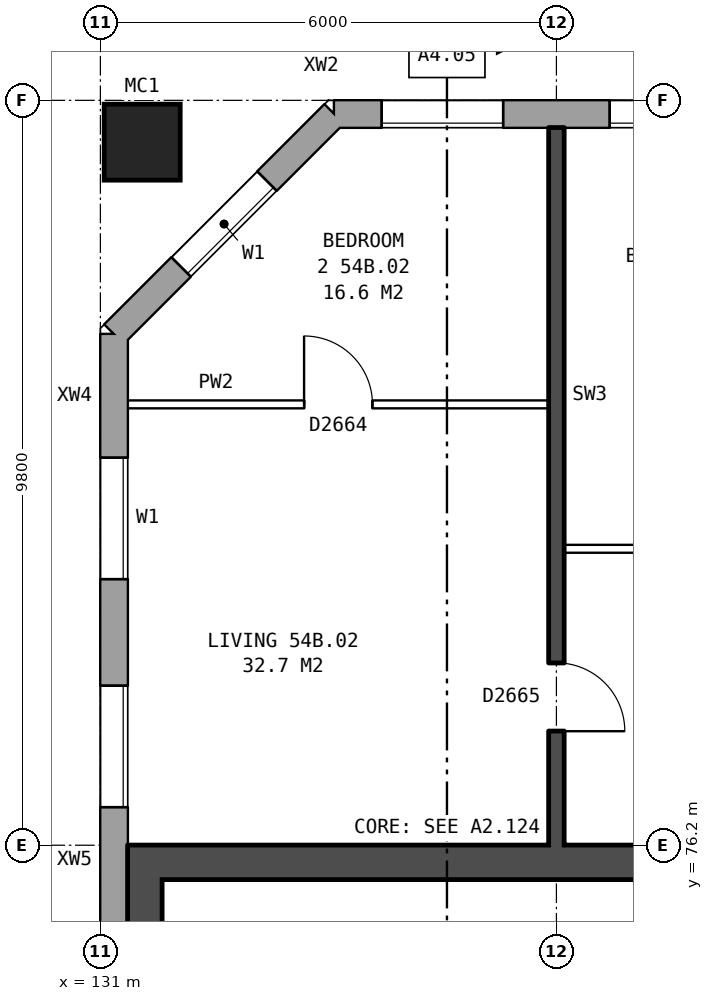
"""IFC4 building model, lengths in metres.
Left out: names, types, materials, properties, quantities, classifications, styles, units other than length and angle.
Written with IfcOpenShell. Run it as: python <this file> out.ifc"""

import sys

from ifc_helpers import new_model, si_unit, direction, frame, frame_2d, origin, origin_2d, place, context, subcontext, project, spatial, rectangle, hollow_rectangle, extrude, element, fill, save


model = new_model("IFC4")
c1 = context("Model", 3, precision=1e-05, world=origin(), true_north=direction((0.0, 1.0)))
c2 = subcontext(c1, "Body", "Model", "MODEL_VIEW")
j1 = project(units=[si_unit("LENGTHUNIT", "METRE"), si_unit("PLANEANGLEUNIT", "RADIAN")], contexts=[c1])
p1 = place(None, origin())
s1 = spatial("IfcSite", under=j1, at=p1, CompositionType="ELEMENT")
p2 = place(p1, origin())
s2 = spatial("IfcBuilding", under=s1, at=p2, CompositionType="ELEMENT")
p3 = place(p2, frame((0.0, 0.0, 191.3)))
s3 = spatial("IfcBuildingStorey", under=s2, at=p3, CompositionType="ELEMENT", Elevation=191.3)
p4 = place(p3, frame((131.55, 85.45, 0.0), z_axis=(0.0, 0.0, 1.0), x_axis=(1.0, 0.0, 0.0)))
e1 = element("IfcColumn", 1, at=p4, inside=s3, PredefinedType="COLUMN", context=c2, shape_type="SweptSolid", body=[
    extrude(hollow_rectangle(XDim=1.0, YDim=1.0, WallThickness=0.055, at=origin_2d()), origin(), (0.0, 0.0, 1.0), 3.1),
])
p5 = place(p3, frame((167.175, 85.82, 0.0), z_axis=(0.0, 0.0, 1.0), x_axis=(-1.0, 0.0, 0.0)))
e2 = element("IfcWall", 2, at=p5, inside=s3, PredefinedType="STANDARD", context=c2, shape_type="SweptSolid", body=[
    extrude(rectangle(XDim=33.101, YDim=0.36, at=frame_2d((16.55, 0.0))), origin(), (0.0, 0.0, 1.0), 2.85),
])
p6 = place(p5, frame((0.875, 0.0, 0.8)))
e3 = element("IfcOpeningElement", 3, at=p6, cuts=e2, PredefinedType="OPENING", context=c2, shape_type="SweptSolid", body=[
    extrude(rectangle(XDim=1.6, YDim=1.8, at=frame_2d((0.8, 0.9))), frame((0.0, 0.19, 0.0), z_axis=(0.0, -1.0, 0.0), x_axis=(1.0, 0.0, 0.0)), (0.0, 0.0, 1.0), 0.38),
])
p7 = place(p5, frame((3.875, 0.0, 0.8)))
e4 = element("IfcOpeningElement", 4, at=p7, cuts=e2, PredefinedType="OPENING", context=c2, shape_type="SweptSolid", body=[
    extrude(rectangle(XDim=1.6, YDim=1.8, at=frame_2d((0.8, 0.9))), frame((0.0, 0.19, 0.0), z_axis=(0.0, -1.0, 0.0), x_axis=(1.0, 0.0, 0.0)), (0.0, 0.0, 1.0), 0.38),
])
p8 = place(p5, frame((6.875, 0.0, 0.8)))
e5 = element("IfcOpeningElement", 5, at=p8, cuts=e2, PredefinedType="OPENING", context=c2, shape_type="SweptSolid", body=[
    extrude(rectangle(XDim=1.6, YDim=1.8, at=frame_2d((0.8, 0.9))), frame((0.0, 0.19, 0.0), z_axis=(0.0, -1.0, 0.0), x_axis=(1.0, 0.0, 0.0)), (0.0, 0.0, 1.0), 0.38),
])
p9 = place(p5, frame((9.875, 0.0, 0.8)))
e6 = element("IfcOpeningElement", 6, at=p9, cuts=e2, PredefinedType="OPENING", context=c2, shape_type="SweptSolid", body=[
    extrude(rectangle(XDim=1.6, YDim=1.8, at=frame_2d((0.8, 0.9))), frame((0.0, 0.19, 0.0), z_axis=(0.0, -1.0, 0.0), x_axis=(1.0, 0.0, 0.0)), (0.0, 0.0, 1.0), 0.38),
])
p10 = place(p5, frame((12.875, 0.0, 0.8)))
e7 = element("IfcOpeningElement", 7, at=p10, cuts=e2, PredefinedType="OPENING", context=c2, shape_type="SweptSolid", body=[
    extrude(rectangle(XDim=1.6, YDim=1.8, at=frame_2d((0.8, 0.9))), frame((0.0, 0.19, 0.0), z_axis=(0.0, -1.0, 0.0), x_axis=(1.0, 0.0, 0.0)), (0.0, 0.0, 1.0), 0.38),
])
p11 = place(p5, frame((15.925, 0.0, 0.15)))
e8 = element("IfcOpeningElement", 8, at=p11, cuts=e2, PredefinedType="OPENING", context=c2, shape_type="SweptSolid", body=[
    extrude(rectangle(XDim=1.2, YDim=1.2, at=frame_2d((0.6, 0.6))), frame((0.0, 0.19, 0.0), z_axis=(0.0, -1.0, 0.0), x_axis=(1.0, 0.0, 0.0)), (0.0, 0.0, 1.0), 0.38),
])
p12 = place(p5, frame((18.875, 0.0, 0.8)))
e9 = element("IfcOpeningElement", 9, at=p12, cuts=e2, PredefinedType="OPENING", context=c2, shape_type="SweptSolid", body=[
    extrude(rectangle(XDim=1.6, YDim=1.8, at=frame_2d((0.8, 0.9))), frame((0.0, 0.19, 0.0), z_axis=(0.0, -1.0, 0.0), x_axis=(1.0, 0.0, 0.0)), (0.0, 0.0, 1.0), 0.38),
])
p13 = place(p5, frame((21.875, 0.0, 0.8)))
e10 = element("IfcOpeningElement", 10, at=p13, cuts=e2, PredefinedType="OPENING", context=c2, shape_type="SweptSolid", body=[
    extrude(rectangle(XDim=1.6, YDim=1.8, at=frame_2d((0.8, 0.9))), frame((0.0, 0.19, 0.0), z_axis=(0.0, -1.0, 0.0), x_axis=(1.0, 0.0, 0.0)), (0.0, 0.0, 1.0), 0.38),
])
p14 = place(p5, frame((24.875, 0.0, 0.8)))
e11 = element("IfcOpeningElement", 11, at=p14, cuts=e2, PredefinedType="OPENING", context=c2, shape_type="SweptSolid", body=[
    extrude(rectangle(XDim=1.6, YDim=1.8, at=frame_2d((0.8, 0.9))), frame((0.0, 0.19, 0.0), z_axis=(0.0, -1.0, 0.0), x_axis=(1.0, 0.0, 0.0)), (0.0, 0.0, 1.0), 0.38),
])
p15 = place(p5, frame((27.875, 0.0, 0.8)))
e12 = element("IfcOpeningElement", 12, at=p15, cuts=e2, PredefinedType="OPENING", context=c2, shape_type="SweptSolid", body=[
    extrude(rectangle(XDim=1.6, YDim=1.8, at=frame_2d((0.8, 0.9))), frame((0.0, 0.19, 0.0), z_axis=(0.0, -1.0, 0.0), x_axis=(1.0, 0.0, 0.0)), (0.0, 0.0, 1.0), 0.38),
])
p16 = place(p5, frame((30.875, 0.0, 0.8)))
e13 = element("IfcOpeningElement", 13, at=p16, cuts=e2, PredefinedType="OPENING", context=c2, shape_type="SweptSolid", body=[
    extrude(rectangle(XDim=1.6, YDim=1.8, at=frame_2d((0.8, 0.9))), frame((0.0, 0.19, 0.0), z_axis=(0.0, -1.0, 0.0), x_axis=(1.0, 0.0, 0.0)), (0.0, 0.0, 1.0), 0.38),
])
p17 = place(p3, frame((134.075, 85.82, 0.0), z_axis=(0.0, 0.0, 1.0), x_axis=(-0.707106781187, -0.707106781187, 0.0)))
e14 = element("IfcWall", 14, at=p17, inside=s3, PredefinedType="STANDARD", context=c2, shape_type="SweptSolid", body=[
    extrude(rectangle(XDim=4.094, YDim=0.36, at=frame_2d((2.047, 0.0))), origin(), (0.0, 0.0, 1.0), 2.85),
])
p18 = place(p17, frame((1.247, 0.0, 0.8)))
e15 = element("IfcOpeningElement", 15, at=p18, cuts=e14, PredefinedType="OPENING", context=c2, shape_type="SweptSolid", body=[
    extrude(rectangle(XDim=1.6, YDim=1.8, at=frame_2d((0.8, 0.9))), frame((0.0, 0.19, 0.0), z_axis=(0.0, -1.0, 0.0), x_axis=(1.0, 0.0, 0.0)), (0.0, 0.0, 1.0), 0.38),
])
p19 = place(p3, frame((131.18, 82.925, 0.0), z_axis=(0.0, 0.0, 1.0), x_axis=(0.0, -1.0, 0.0)))
e16 = element("IfcWall", 16, at=p19, inside=s3, PredefinedType="STANDARD", context=c2, shape_type="SweptSolid", body=[
    extrude(rectangle(XDim=6.522, YDim=0.36, at=frame_2d((3.261, 0.0))), origin(), (0.0, 0.0, 1.0), 2.85),
])
p20 = place(p19, frame((1.625, 0.0, 0.8)))
e17 = element("IfcOpeningElement", 17, at=p20, cuts=e16, PredefinedType="OPENING", context=c2, shape_type="SweptSolid", body=[
    extrude(rectangle(XDim=1.6, YDim=1.8, at=frame_2d((0.8, 0.9))), frame((0.0, 0.19, 0.0), z_axis=(0.0, -1.0, 0.0), x_axis=(1.0, 0.0, 0.0)), (0.0, 0.0, 1.0), 0.38),
])
p21 = place(p19, frame((4.625, 0.0, 0.8)))
e18 = element("IfcOpeningElement", 18, at=p21, cuts=e16, PredefinedType="OPENING", context=c2, shape_type="SweptSolid", body=[
    extrude(rectangle(XDim=1.6, YDim=1.8, at=frame_2d((0.8, 0.9))), frame((0.0, 0.19, 0.0), z_axis=(0.0, -1.0, 0.0), x_axis=(1.0, 0.0, 0.0)), (0.0, 0.0, 1.0), 0.38),
])
p22 = place(p3, frame((131.18, 76.403, 0.0), z_axis=(0.0, 0.0, 1.0), x_axis=(0.0, -1.0, 0.0)))
e19 = element("IfcWall", 19, at=p22, inside=s3, PredefinedType="STANDARD", context=c2, shape_type="SweptSolid", body=[
    extrude(rectangle(XDim=0.806, YDim=0.36, at=frame_2d((0.403, 0.0))), origin(), (0.0, 0.0, 1.0), 1.947),
])
p23 = place(p3, frame((131.18, 75.597, 0.0), z_axis=(0.0, 0.0, 1.0), x_axis=(0.0, -1.0, 0.0)))
e20 = element("IfcWall", 20, at=p23, inside=s3, PredefinedType="STANDARD", context=c2, shape_type="SweptSolid", body=[
    extrude(rectangle(XDim=11.194, YDim=0.36, at=frame_2d((5.597, 0.0))), origin(), (0.0, 0.0, 1.0), 2.85),
])
p24 = place(p3, frame((131.585, 63.8, 0.0), z_axis=(0.0, 0.0, 1.0), x_axis=(0.0, 1.0, 0.0)))
e21 = element("IfcWall", 21, at=p24, inside=s3, PredefinedType="SHEAR", context=c2, shape_type="SweptSolid", body=[
    extrude(rectangle(XDim=12.4, YDim=0.45, at=frame_2d((6.2, 0.0))), origin(), (0.0, 0.0, 1.0), 2.85),
])
p25 = place(p3, frame((139.31, 75.975, 0.0), z_axis=(0.0, 0.0, 1.0), x_axis=(-1.0, 0.0, 0.0)))
e22 = element("IfcWall", 22, at=p25, inside=s3, PredefinedType="SHEAR", context=c2, shape_type="SweptSolid", body=[
    extrude(rectangle(XDim=7.5, YDim=0.45, at=frame_2d((3.75, 0.0))), origin(), (0.0, 0.0, 1.0), 2.85),
])
p26 = place(p3, frame((137.1, 80.1, 0.0), z_axis=(0.0, 0.0, 1.0), x_axis=(1.0, 0.0, 0.0)))
e23 = element("IfcWall", 23, at=p26, inside=s3, PredefinedType="PARTITIONING", context=c2, shape_type="SweptSolid", body=[
    extrude(rectangle(XDim=5.8, YDim=0.1, at=frame_2d((2.9, 0.0))), origin(), (0.0, 0.0, 1.0), 2.85),
])
p27 = place(p26, frame((1.3, 0.0, 0.0)))
e24 = element("IfcOpeningElement", 24, at=p27, cuts=e23, PredefinedType="OPENING", context=c2, shape_type="SweptSolid", body=[
    extrude(rectangle(XDim=0.9, YDim=2.1, at=frame_2d((0.45, 1.05))), frame((0.0, 0.06, 0.0), z_axis=(0.0, -1.0, 0.0), x_axis=(1.0, 0.0, 0.0)), (0.0, 0.0, 1.0), 0.12),
])
p28 = place(p26, frame((4.2, 0.0, 0.0)))
e25 = element("IfcOpeningElement", 25, at=p28, cuts=e23, PredefinedType="OPENING", context=c2, shape_type="SweptSolid", body=[
    extrude(rectangle(XDim=0.9, YDim=2.1, at=frame_2d((0.45, 1.05))), frame((0.0, 0.06, 0.0), z_axis=(0.0, -1.0, 0.0), x_axis=(1.0, 0.0, 0.0)), (0.0, 0.0, 1.0), 0.12),
])
p29 = place(p3, frame((131.36, 82.0, 0.0), z_axis=(0.0, 0.0, 1.0), x_axis=(1.0, 0.0, 0.0)))
e26 = element("IfcWall", 26, at=p29, inside=s3, PredefinedType="PARTITIONING", context=c2, shape_type="SweptSolid", body=[
    extrude(rectangle(XDim=5.54, YDim=0.1, at=frame_2d((2.77, 0.0))), origin(), (0.0, 0.0, 1.0), 2.85),
])
p30 = place(p29, frame((2.32, 0.0, 0.0)))
e27 = element("IfcOpeningElement", 27, at=p30, cuts=e26, PredefinedType="OPENING", context=c2, shape_type="SweptSolid", body=[
    extrude(rectangle(XDim=0.9, YDim=2.1, at=frame_2d((0.45, 1.05))), frame((0.0, 0.06, 0.0), z_axis=(0.0, -1.0, 0.0), x_axis=(1.0, 0.0, 0.0)), (0.0, 0.0, 1.0), 0.12),
])
p31 = place(p3, frame((137.0, 76.2, 0.0), z_axis=(0.0, 0.0, 1.0), x_axis=(0.0, 1.0, 0.0)))
e28 = element("IfcWall", 28, at=p31, inside=s3, PredefinedType="SOLIDWALL", context=c2, shape_type="SweptSolid", body=[
    extrude(rectangle(XDim=9.44, YDim=0.2, at=frame_2d((4.72, 0.0))), origin(), (0.0, 0.0, 1.0), 2.85),
])
p32 = place(p31, frame((1.5, 0.0, 0.0)))
e29 = element("IfcOpeningElement", 29, at=p32, cuts=e28, PredefinedType="OPENING", context=c2, shape_type="SweptSolid", body=[
    extrude(rectangle(XDim=0.9, YDim=2.1, at=frame_2d((0.45, 1.05))), frame((0.0, 0.11, 0.0), z_axis=(0.0, -1.0, 0.0), x_axis=(1.0, 0.0, 0.0)), (0.0, 0.0, 1.0), 0.22),
])
p33 = place(p15, origin())
e30 = element("IfcWindow", 30, at=p33, inside=s3, PartitioningType="SINGLE_PANEL", PredefinedType="WINDOW", context=c2, shape_type="SweptSolid", body=[
    extrude(rectangle(XDim=1.6, YDim=1.8, at=frame_2d((0.8, 0.9))), frame((0.0, 0.15, 0.0), z_axis=(0.0, -1.0, 0.0), x_axis=(1.0, 0.0, 0.0)), (0.0, 0.0, 1.0), 0.06),
])
fill(e12, e30)
p34 = place(p16, origin())
e31 = element("IfcWindow", 31, at=p34, inside=s3, PartitioningType="SINGLE_PANEL", PredefinedType="WINDOW", context=c2, shape_type="SweptSolid", body=[
    extrude(rectangle(XDim=1.6, YDim=1.8, at=frame_2d((0.8, 0.9))), frame((0.0, 0.15, 0.0), z_axis=(0.0, -1.0, 0.0), x_axis=(1.0, 0.0, 0.0)), (0.0, 0.0, 1.0), 0.06),
])
fill(e13, e31)
p35 = place(p18, origin())
e32 = element("IfcWindow", 32, at=p35, inside=s3, PartitioningType="SINGLE_PANEL", PredefinedType="WINDOW", context=c2, shape_type="SweptSolid", body=[
    extrude(rectangle(XDim=1.6, YDim=1.8, at=frame_2d((0.8, 0.9))), frame((0.0, 0.15, 0.0), z_axis=(0.0, -1.0, 0.0), x_axis=(1.0, 0.0, 0.0)), (0.0, 0.0, 1.0), 0.06),
])
fill(e15, e32)
p36 = place(p20, origin())
e33 = element("IfcWindow", 33, at=p36, inside=s3, PartitioningType="SINGLE_PANEL", PredefinedType="WINDOW", context=c2, shape_type="SweptSolid", body=[
    extrude(rectangle(XDim=1.6, YDim=1.8, at=frame_2d((0.8, 0.9))), frame((0.0, 0.15, 0.0), z_axis=(0.0, -1.0, 0.0), x_axis=(1.0, 0.0, 0.0)), (0.0, 0.0, 1.0), 0.06),
])
fill(e17, e33)
p37 = place(p21, origin())
e34 = element("IfcWindow", 34, at=p37, inside=s3, PartitioningType="SINGLE_PANEL", PredefinedType="WINDOW", context=c2, shape_type="SweptSolid", body=[
    extrude(rectangle(XDim=1.6, YDim=1.8, at=frame_2d((0.8, 0.9))), frame((0.0, 0.15, 0.0), z_axis=(0.0, -1.0, 0.0), x_axis=(1.0, 0.0, 0.0)), (0.0, 0.0, 1.0), 0.06),
])
fill(e18, e34)
p38 = place(p30, origin())
e35 = element("IfcDoor", 35, at=p38, inside=s3, OperationType="SINGLE_SWING_LEFT", PredefinedType="DOOR", context=c2, shape_type="SweptSolid", body=[
    extrude(rectangle(XDim=0.9, YDim=2.1, at=frame_2d((0.45, 1.05))), frame((0.0, 0.025, 0.0), z_axis=(0.0, -1.0, 0.0), x_axis=(1.0, 0.0, 0.0)), (0.0, 0.0, 1.0), 0.05),
])
fill(e27, e35)
p39 = place(p32, frame((0.9, 0.0, 0.0), z_axis=(0.0, 0.0, 1.0), x_axis=(-1.0, 0.0, 0.0)))
e36 = element("IfcDoor", 36, at=p39, inside=s3, OperationType="SINGLE_SWING_RIGHT", PredefinedType="DOOR", context=c2, shape_type="SweptSolid", body=[
    extrude(rectangle(XDim=0.9, YDim=2.1, at=frame_2d((0.45, 1.05))), frame((0.0, 0.025, 0.0), z_axis=(0.0, -1.0, 0.0), x_axis=(1.0, 0.0, 0.0)), (0.0, 0.0, 1.0), 0.05),
])
fill(e29, e36)
save(model, sys.argv[1])
